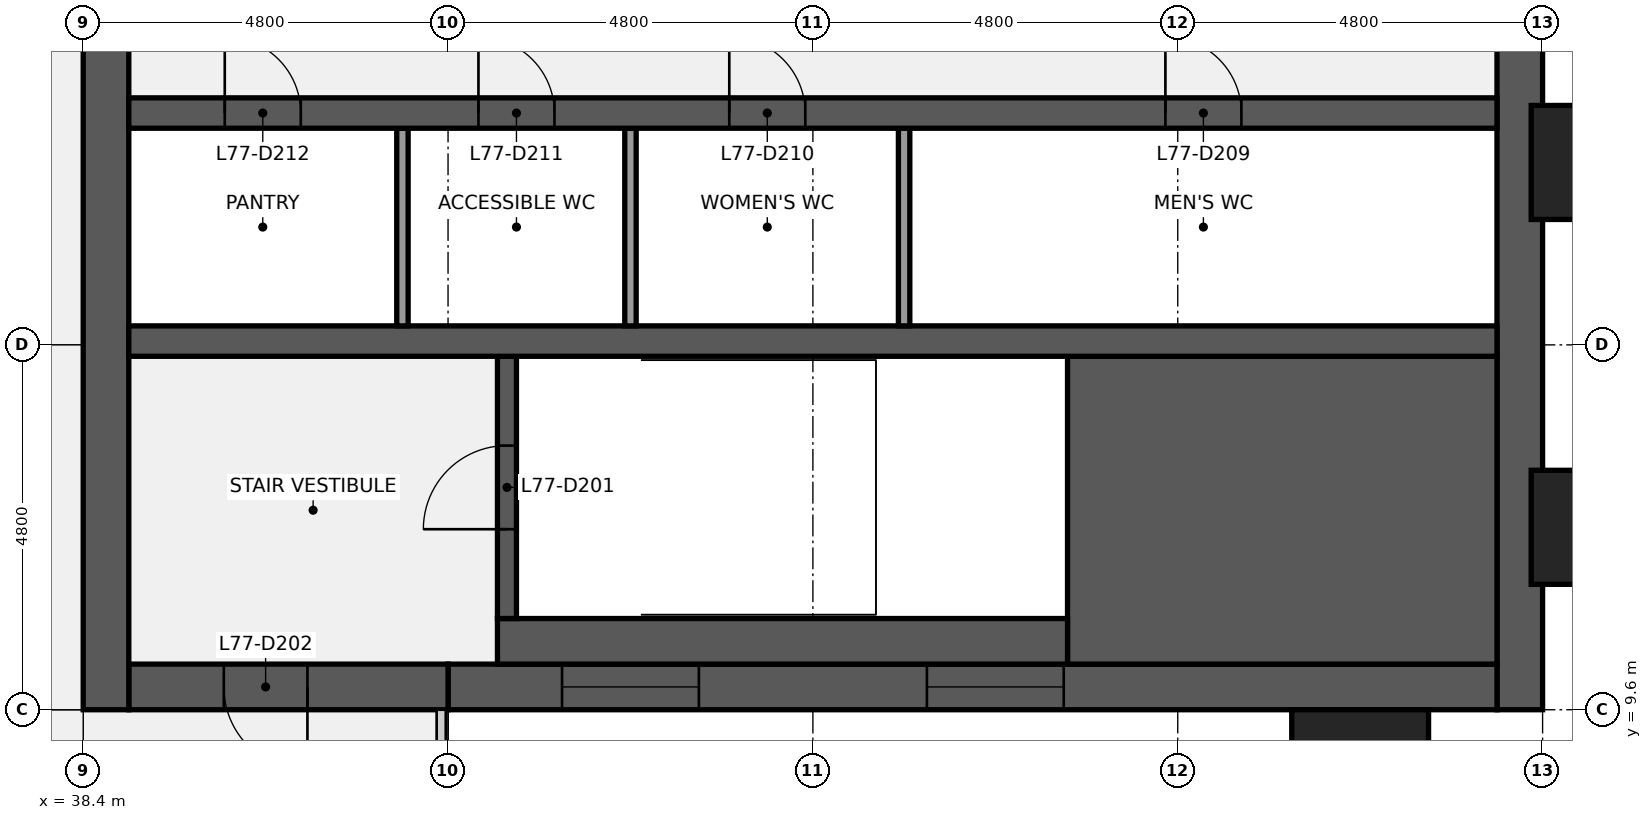
"""IFC4 building model, lengths in metres.
Left out: names, types, materials, properties, quantities, classifications, styles, units other than length and angle.
Written with IfcOpenShell. Run it as: python <this file> out.ifc"""

import sys

from ifc_helpers import new_model, si_unit, direction, frame, frame_2d, origin, origin_2d, place, context, subcontext, project, spatial, rectangle, extrude, element, fill, save


model = new_model("IFC4")
c1 = context("Model", 3, precision=1e-05, world=origin(), true_north=direction((0.0, 1.0)))
c2 = subcontext(c1, "Body", "Model", "MODEL_VIEW")
j1 = project(units=[si_unit("LENGTHUNIT", "METRE"), si_unit("PLANEANGLEUNIT", "RADIAN")], contexts=[c1])
p1 = place(None, origin())
s1 = spatial("IfcSite", under=j1, at=p1, CompositionType="ELEMENT")
p2 = place(p1, origin())
s2 = spatial("IfcBuilding", under=s1, at=p2, CompositionType="ELEMENT")
p3 = place(p2, frame((0.0, 0.0, 346.3)))
s3 = spatial("IfcBuildingStorey", under=s2, at=p3, CompositionType="ELEMENT", Elevation=346.3)
p4 = place(p3, frame((57.3, 38.4, 0.0), z_axis=(0.0, 0.0, 1.0), x_axis=(0.0, -1.0, 0.0)))
e1 = element("IfcWall", 1, at=p4, inside=s3, PredefinedType="SHEAR", context=c2, shape_type="SweptSolid", body=[
    extrude(rectangle(XDim=28.8, YDim=0.6, at=frame_2d((14.4, 0.0))), origin(), (0.0, 0.0, 1.0), 3.84),
])
p5 = place(p4, frame((18.45, 0.0, 0.9)))
e2 = element("IfcOpeningElement", 2, at=p5, cuts=e1, PredefinedType="OPENING", context=c2, shape_type="SweptSolid", body=[
    extrude(rectangle(XDim=1.5, YDim=1.5, at=frame_2d((0.75, 0.75))), frame((0.0, 0.31, 0.0), z_axis=(0.0, -1.0, 0.0), x_axis=(1.0, 0.0, 0.0)), (0.0, 0.0, 1.0), 0.62),
])
p6 = place(p4, frame((8.85, 0.0, 0.9)))
e3 = element("IfcOpeningElement", 3, at=p6, cuts=e1, PredefinedType="OPENING", context=c2, shape_type="SweptSolid", body=[
    extrude(rectangle(XDim=1.5, YDim=1.5, at=frame_2d((0.75, 0.75))), frame((0.0, 0.31, 0.0), z_axis=(0.0, -1.0, 0.0), x_axis=(1.0, 0.0, 0.0)), (0.0, 0.0, 1.0), 0.62),
])
p7 = place(p3, frame((57.0, 9.9, 0.0), z_axis=(0.0, 0.0, 1.0), x_axis=(-1.0, 0.0, 0.0)))
e4 = element("IfcWall", 4, at=p7, inside=s3, PredefinedType="SHEAR", context=c2, shape_type="SweptSolid", body=[
    extrude(rectangle(XDim=13.8, YDim=0.6, at=frame_2d((6.9, 0.0))), origin(), (0.0, 0.0, 1.0), 3.84),
])
p8 = place(p7, frame((5.7, 0.0, 0.9)))
e5 = element("IfcOpeningElement", 5, at=p8, cuts=e4, PredefinedType="OPENING", context=c2, shape_type="SweptSolid", body=[
    extrude(rectangle(XDim=1.8, YDim=1.5, at=frame_2d((0.9, 0.75))), frame((0.0, 0.31, 0.0), z_axis=(0.0, -1.0, 0.0), x_axis=(1.0, 0.0, 0.0)), (0.0, 0.0, 1.0), 0.62),
])
p9 = place(p7, frame((10.5, 0.0, 0.9)))
e6 = element("IfcOpeningElement", 6, at=p9, cuts=e4, PredefinedType="OPENING", context=c2, shape_type="SweptSolid", body=[
    extrude(rectangle(XDim=1.8, YDim=1.5, at=frame_2d((0.9, 0.75))), frame((0.0, 0.31, 0.0), z_axis=(0.0, -1.0, 0.0), x_axis=(1.0, 0.0, 0.0)), (0.0, 0.0, 1.0), 0.62),
])
p10 = place(p3, frame((43.2, 9.9, 0.0), z_axis=(0.0, 0.0, 1.0), x_axis=(-1.0, 0.0, 0.0)))
e7 = element("IfcWall", 7, at=p10, inside=s3, PredefinedType="SHEAR", context=c2, shape_type="SweptSolid", body=[
    extrude(rectangle(XDim=4.2, YDim=0.6, at=frame_2d((2.1, 0.0))), origin(), (0.0, 0.0, 1.0), 3.84),
])
p11 = place(p10, frame((1.85, 0.0, 0.0)))
e8 = element("IfcOpeningElement", 8, at=p11, cuts=e7, PredefinedType="OPENING", context=c2, shape_type="SweptSolid", body=[
    extrude(rectangle(XDim=1.1, YDim=2.1, at=frame_2d((0.55, 1.05))), frame((0.0, 0.31, 0.0), z_axis=(0.0, -1.0, 0.0), x_axis=(1.0, 0.0, 0.0)), (0.0, 0.0, 1.0), 0.62),
])
p12 = place(p3, frame((38.7, 9.6, 0.0), z_axis=(0.0, 0.0, 1.0), x_axis=(0.0, 1.0, 0.0)))
e9 = element("IfcWall", 9, at=p12, inside=s3, PredefinedType="SHEAR", context=c2, shape_type="SweptSolid", body=[
    extrude(rectangle(XDim=28.8, YDim=0.6, at=frame_2d((14.4, 0.0))), origin(), (0.0, 0.0, 1.0), 3.84),
])
p13 = place(p12, frame((8.7, 0.0, 0.0)))
e10 = element("IfcOpeningElement", 10, at=p13, cuts=e9, PredefinedType="OPENING", context=c2, shape_type="SweptSolid", body=[
    extrude(rectangle(XDim=1.8, YDim=2.1, at=frame_2d((0.9, 1.05))), frame((0.0, 0.31, 0.0), z_axis=(0.0, -1.0, 0.0), x_axis=(1.0, 0.0, 0.0)), (0.0, 0.0, 1.0), 0.62),
])
p14 = place(p12, frame((18.3, 0.0, 0.0)))
e11 = element("IfcOpeningElement", 11, at=p14, cuts=e9, PredefinedType="OPENING", context=c2, shape_type="SweptSolid", body=[
    extrude(rectangle(XDim=1.8, YDim=2.1, at=frame_2d((0.9, 1.05))), frame((0.0, 0.31, 0.0), z_axis=(0.0, -1.0, 0.0), x_axis=(1.0, 0.0, 0.0)), (0.0, 0.0, 1.0), 0.62),
])
p15 = place(p3, frame((51.35, 12.225, 0.0), z_axis=(0.0, 0.0, 1.0), x_axis=(1.0, 0.0, 0.0)))
e12 = element("IfcWall", 12, at=p15, inside=s3, PredefinedType="SHEAR", context=c2, shape_type="SweptSolid", body=[
    extrude(rectangle(XDim=5.65, YDim=4.05, at=frame_2d((2.825, 0.0))), origin(), (0.0, 0.0, 1.0), 3.84),
])
p16 = place(p3, frame((43.85, 10.5, 0.0), z_axis=(0.0, 0.0, 1.0), x_axis=(1.0, 0.0, 0.0)))
e13 = element("IfcWall", 13, at=p16, inside=s3, PredefinedType="SHEAR", context=c2, shape_type="SweptSolid", body=[
    extrude(rectangle(XDim=7.5, YDim=0.6, at=frame_2d((3.75, 0.0))), origin(), (0.0, 0.0, 1.0), 3.84),
])
p17 = place(p3, frame((43.975, 10.8, 0.0), z_axis=(0.0, 0.0, 1.0), x_axis=(0.0, 1.0, 0.0)))
e14 = element("IfcWall", 14, at=p17, inside=s3, PredefinedType="SHEAR", context=c2, shape_type="SweptSolid", body=[
    extrude(rectangle(XDim=3.45, YDim=0.25, at=frame_2d((1.725, 0.0))), origin(), (0.0, 0.0, 1.0), 3.84),
])
p18 = place(p17, frame((1.175, 0.0, 0.0)))
e15 = element("IfcOpeningElement", 15, at=p18, cuts=e14, PredefinedType="OPENING", context=c2, shape_type="SweptSolid", body=[
    extrude(rectangle(XDim=1.1, YDim=2.1, at=frame_2d((0.55, 1.05))), frame((0.0, 0.135, 0.0), z_axis=(0.0, -1.0, 0.0), x_axis=(1.0, 0.0, 0.0)), (0.0, 0.0, 1.0), 0.27),
])
p19 = place(p3, frame((39.0, 14.45, 0.0), z_axis=(0.0, 0.0, 1.0), x_axis=(1.0, 0.0, 0.0)))
e16 = element("IfcWall", 16, at=p19, inside=s3, PredefinedType="SHEAR", context=c2, shape_type="SweptSolid", body=[
    extrude(rectangle(XDim=18.0, YDim=0.4, at=frame_2d((9.0, 0.0))), origin(), (0.0, 0.0, 1.0), 3.84),
])
for number, where, z_axis, x_axis in (
    (17, (49.2, 14.65, 0.0), (0.0, 0.0, 1.0), (0.0, 1.0, 0.0)),
    (18, (45.6, 14.65, 0.0), (0.0, 0.0, 1.0), (0.0, 1.0, 0.0)),
    (19, (42.6, 14.65, 0.0), (0.0, 0.0, 1.0), (0.0, 1.0, 0.0)),
):
    element("IfcWall", number, at=place(p3, frame(where, z_axis=z_axis, x_axis=x_axis)), inside=s3, PredefinedType="PARTITIONING", context=c2, shape_type="SweptSolid", body=[
        extrude(rectangle(XDim=2.6, YDim=0.15, at=frame_2d((1.3, 0.0))), origin(), (0.0, 0.0, 1.0), 3.84),
    ])
p20 = place(p3, frame((39.0, 17.45, 0.0), z_axis=(0.0, 0.0, 1.0), x_axis=(1.0, 0.0, 0.0)))
e20 = element("IfcWall", 20, at=p20, inside=s3, PredefinedType="SHEAR", context=c2, shape_type="SweptSolid", body=[
    extrude(rectangle(XDim=18.0, YDim=0.4, at=frame_2d((9.0, 0.0))), origin(), (0.0, 0.0, 1.0), 3.84),
])
p21 = place(p20, frame((13.637, 0.0, 0.0)))
e21 = element("IfcOpeningElement", 21, at=p21, cuts=e20, PredefinedType="OPENING", context=c2, shape_type="SweptSolid", body=[
    extrude(rectangle(XDim=1.0, YDim=2.1, at=frame_2d((0.5, 1.05))), frame((0.0, 0.21, 0.0), z_axis=(0.0, -1.0, 0.0), x_axis=(1.0, 0.0, 0.0)), (0.0, 0.0, 1.0), 0.42),
])
p22 = place(p20, frame((7.9, 0.0, 0.0)))
e22 = element("IfcOpeningElement", 22, at=p22, cuts=e20, PredefinedType="OPENING", context=c2, shape_type="SweptSolid", body=[
    extrude(rectangle(XDim=1.0, YDim=2.1, at=frame_2d((0.5, 1.05))), frame((0.0, 0.21, 0.0), z_axis=(0.0, -1.0, 0.0), x_axis=(1.0, 0.0, 0.0)), (0.0, 0.0, 1.0), 0.42),
])
p23 = place(p20, frame((4.6, 0.0, 0.0)))
e23 = element("IfcOpeningElement", 23, at=p23, cuts=e20, PredefinedType="OPENING", context=c2, shape_type="SweptSolid", body=[
    extrude(rectangle(XDim=1.0, YDim=2.1, at=frame_2d((0.5, 1.05))), frame((0.0, 0.21, 0.0), z_axis=(0.0, -1.0, 0.0), x_axis=(1.0, 0.0, 0.0)), (0.0, 0.0, 1.0), 0.42),
])
p24 = place(p20, frame((1.262, 0.0, 0.0)))
e24 = element("IfcOpeningElement", 24, at=p24, cuts=e20, PredefinedType="OPENING", context=c2, shape_type="SweptSolid", body=[
    extrude(rectangle(XDim=1.0, YDim=2.1, at=frame_2d((0.5, 1.05))), frame((0.0, 0.21, 0.0), z_axis=(0.0, -1.0, 0.0), x_axis=(1.0, 0.0, 0.0)), (0.0, 0.0, 1.0), 0.42),
])
for number, where, z_axis, x_axis in (
    (25, (55.2, 8.85, 0.0), (0.0, 0.0, 1.0), (1.0, 0.0, 0.0)),
    (26, (58.35, 12.0, 0.0), (0.0, 0.0, 1.0), (0.0, 1.0, 0.0)),
    (27, (58.35, 16.8, 0.0), (0.0, 0.0, 1.0), (0.0, 1.0, 0.0)),
):
    element("IfcColumn", number, at=place(p3, frame(where, z_axis=z_axis, x_axis=x_axis)), inside=s3, PredefinedType="PILASTER", context=c2, shape_type="SweptSolid", body=[
        extrude(rectangle(XDim=1.8, YDim=1.5, at=origin_2d()), origin(), (0.0, 0.0, 1.0), 4.0),
    ])
p25 = place(p18, origin())
e28 = element("IfcDoor", 28, at=p25, inside=s3, OperationType="SINGLE_SWING_LEFT", PredefinedType="DOOR", context=c2, shape_type="SweptSolid", body=[
    extrude(rectangle(XDim=1.1, YDim=2.1, at=frame_2d((0.55, 1.05))), frame((0.0, 0.025, 0.0), z_axis=(0.0, -1.0, 0.0), x_axis=(1.0, 0.0, 0.0)), (0.0, 0.0, 1.0), 0.05),
])
fill(e15, e28)
p26 = place(p11, origin())
e29 = element("IfcDoor", 29, at=p26, inside=s3, OperationType="SINGLE_SWING_LEFT", PredefinedType="DOOR", context=c2, shape_type="SweptSolid", body=[
    extrude(rectangle(XDim=1.1, YDim=2.1, at=frame_2d((0.55, 1.05))), frame((0.0, 0.025, 0.0), z_axis=(0.0, -1.0, 0.0), x_axis=(1.0, 0.0, 0.0)), (0.0, 0.0, 1.0), 0.05),
])
fill(e8, e29)
p27 = place(p21, origin())
e30 = element("IfcDoor", 30, at=p27, inside=s3, OperationType="SINGLE_SWING_LEFT", PredefinedType="DOOR", context=c2, shape_type="SweptSolid", body=[
    extrude(rectangle(XDim=1.0, YDim=2.1, at=frame_2d((0.5, 1.05))), frame((0.0, 0.025, 0.0), z_axis=(0.0, -1.0, 0.0), x_axis=(1.0, 0.0, 0.0)), (0.0, 0.0, 1.0), 0.05),
])
fill(e21, e30)
p28 = place(p22, origin())
e31 = element("IfcDoor", 31, at=p28, inside=s3, OperationType="SINGLE_SWING_LEFT", PredefinedType="DOOR", context=c2, shape_type="SweptSolid", body=[
    extrude(rectangle(XDim=1.0, YDim=2.1, at=frame_2d((0.5, 1.05))), frame((0.0, 0.025, 0.0), z_axis=(0.0, -1.0, 0.0), x_axis=(1.0, 0.0, 0.0)), (0.0, 0.0, 1.0), 0.05),
])
fill(e22, e31)
p29 = place(p23, origin())
e32 = element("IfcDoor", 32, at=p29, inside=s3, OperationType="SINGLE_SWING_LEFT", PredefinedType="DOOR", context=c2, shape_type="SweptSolid", body=[
    extrude(rectangle(XDim=1.0, YDim=2.1, at=frame_2d((0.5, 1.05))), frame((0.0, 0.025, 0.0), z_axis=(0.0, -1.0, 0.0), x_axis=(1.0, 0.0, 0.0)), (0.0, 0.0, 1.0), 0.05),
])
fill(e23, e32)
p30 = place(p24, origin())
e33 = element("IfcDoor", 33, at=p30, inside=s3, OperationType="SINGLE_SWING_LEFT", PredefinedType="DOOR", context=c2, shape_type="SweptSolid", body=[
    extrude(rectangle(XDim=1.0, YDim=2.1, at=frame_2d((0.5, 1.05))), frame((0.0, 0.025, 0.0), z_axis=(0.0, -1.0, 0.0), x_axis=(1.0, 0.0, 0.0)), (0.0, 0.0, 1.0), 0.05),
])
fill(e24, e33)
p31 = place(p8, origin())
e34 = element("IfcWindow", 34, at=p31, inside=s3, PartitioningType="SINGLE_PANEL", PredefinedType="WINDOW", context=c2, shape_type="SweptSolid", body=[
    extrude(rectangle(XDim=1.8, YDim=1.5, at=frame_2d((0.9, 0.75))), frame((0.0, 0.03, 0.0), z_axis=(0.0, -1.0, 0.0), x_axis=(1.0, 0.0, 0.0)), (0.0, 0.0, 1.0), 0.06),
])
fill(e5, e34)
p32 = place(p9, origin())
e35 = element("IfcWindow", 35, at=p32, inside=s3, PartitioningType="SINGLE_PANEL", PredefinedType="WINDOW", context=c2, shape_type="SweptSolid", body=[
    extrude(rectangle(XDim=1.8, YDim=1.5, at=frame_2d((0.9, 0.75))), frame((0.0, 0.03, 0.0), z_axis=(0.0, -1.0, 0.0), x_axis=(1.0, 0.0, 0.0)), (0.0, 0.0, 1.0), 0.06),
])
fill(e6, e35)
save(model, sys.argv[1])
